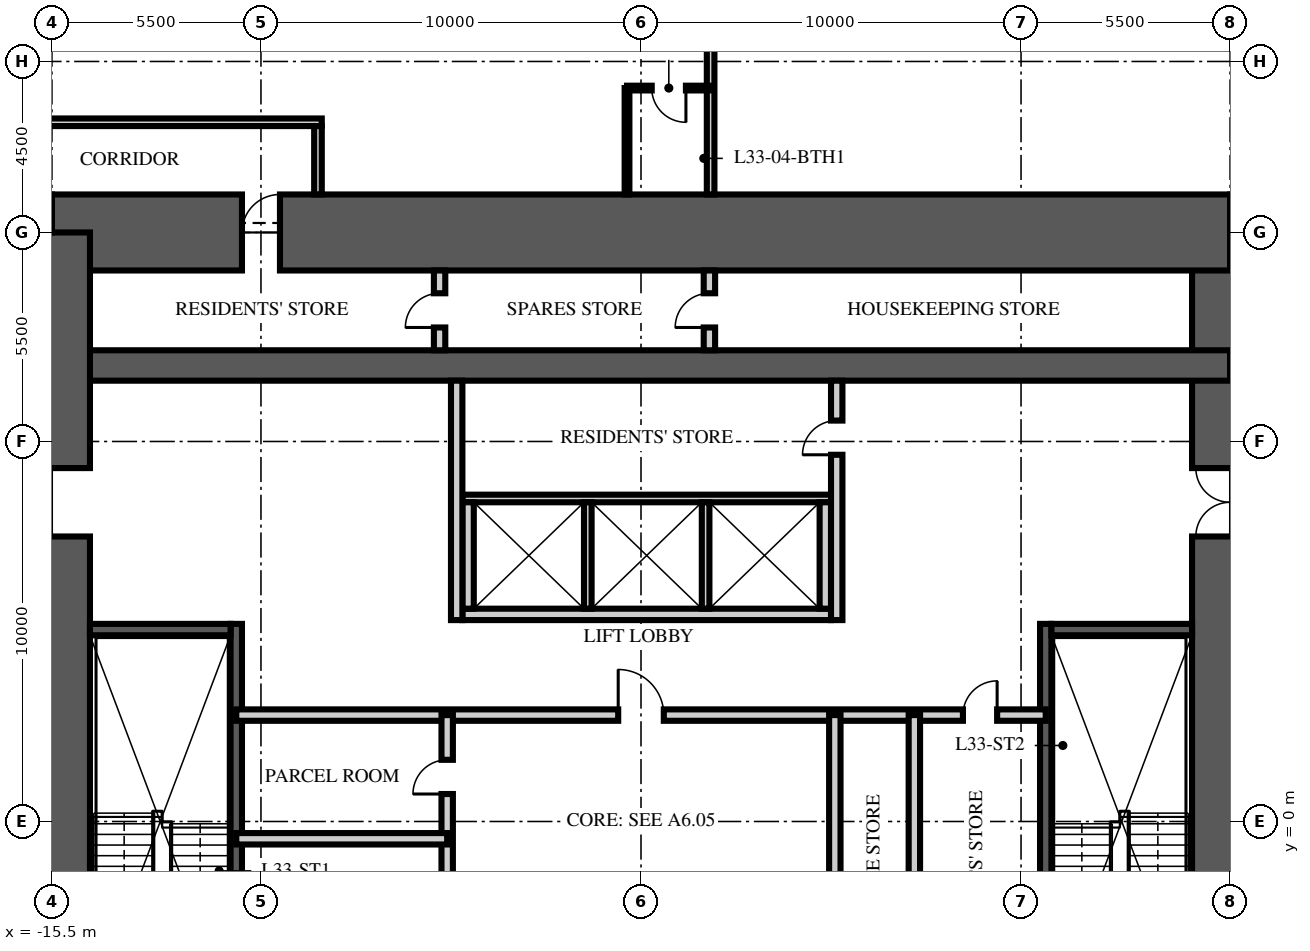
"""IFC4 building model, lengths in metres.
Left out: names, types, materials, properties, quantities, classifications, styles, units other than length and angle.
Written with IfcOpenShell. Run it as: python <this file> out.ifc"""

import sys

from ifc_helpers import new_model, si_unit, direction, frame, frame_2d, origin, place, context, subcontext, project, spatial, rectangle, extrude, element, fill, save


model = new_model("IFC4")
c1 = context("Model", 3, precision=1e-05, world=origin(), true_north=direction((0.0, 1.0)))
c2 = subcontext(c1, "Body", "Model", "MODEL_VIEW")
j1 = project(units=[si_unit("LENGTHUNIT", "METRE"), si_unit("PLANEANGLEUNIT", "RADIAN")], contexts=[c1])
p1 = place(None, origin())
s1 = spatial("IfcSite", under=j1, at=p1, CompositionType="ELEMENT")
p2 = place(p1, origin())
s2 = spatial("IfcBuilding", under=s1, at=p2, CompositionType="ELEMENT")
p3 = place(p2, frame((0.0, 0.0, 133.5)))
s3 = spatial("IfcBuildingStorey", under=s2, at=p3, CompositionType="ELEMENT", Elevation=133.5)
p4 = place(p3, frame((15.5, -15.5, -0.25), z_axis=(0.0, 0.0, 1.0), x_axis=(0.0, 1.0, 0.0)))
e1 = element("IfcWall", 1, at=p4, inside=s3, PredefinedType="SHEAR", context=c2, shape_type="SweptSolid", body=[
    extrude(rectangle(XDim=31.0, YDim=2.0, at=frame_2d((15.5, 0.0))), origin(), (0.0, 0.0, 1.0), 3.75),
])
p5 = place(p4, frame((6.5, 0.0, 0.25)))
e2 = element("IfcOpeningElement", 2, at=p5, cuts=e1, PredefinedType="OPENING", context=c2, shape_type="SweptSolid", body=[
    extrude(rectangle(XDim=1.2, YDim=2.1, at=frame_2d((0.6, 1.05))), frame((0.0, 1.01, 0.0), z_axis=(0.0, -1.0, 0.0), x_axis=(1.0, 0.0, 0.0)), (0.0, 0.0, 1.0), 2.02),
])
p6 = place(p4, frame((23.0, 0.0, 0.25)))
e3 = element("IfcOpeningElement", 3, at=p6, cuts=e1, PredefinedType="OPENING", context=c2, shape_type="SweptSolid", body=[
    extrude(rectangle(XDim=1.8, YDim=2.1, at=frame_2d((0.9, 1.05))), frame((0.0, 1.01, 0.0), z_axis=(0.0, -1.0, 0.0), x_axis=(1.0, 0.0, 0.0)), (0.0, 0.0, 1.0), 2.02),
])
p7 = place(p3, frame((-15.5, 15.5, -0.25), z_axis=(0.0, 0.0, 1.0), x_axis=(1.0, 0.0, 0.0)))
e4 = element("IfcWall", 4, at=p7, inside=s3, PredefinedType="SHEAR", context=c2, shape_type="SweptSolid", body=[
    extrude(rectangle(XDim=31.0, YDim=2.0, at=frame_2d((15.5, 0.0))), origin(), (0.0, 0.0, 1.0), 3.75),
])
p8 = place(p7, frame((5.0, 0.0, 0.25)))
e5 = element("IfcOpeningElement", 5, at=p8, cuts=e4, PredefinedType="OPENING", context=c2, shape_type="SweptSolid", body=[
    extrude(rectangle(XDim=1.0, YDim=2.1, at=frame_2d((0.5, 1.05))), frame((0.0, 1.01, 0.0), z_axis=(0.0, -1.0, 0.0), x_axis=(1.0, 0.0, 0.0)), (0.0, 0.0, 1.0), 2.02),
])
p9 = place(p3, frame((-15.5, 12.0, -0.25), z_axis=(0.0, 0.0, 1.0), x_axis=(1.0, 0.0, 0.0)))
e6 = element("IfcWall", 6, at=p9, inside=s3, PredefinedType="SHEAR", context=c2, shape_type="SweptSolid", body=[
    extrude(rectangle(XDim=31.0, YDim=0.8, at=frame_2d((15.5, 0.0))), origin(), (0.0, 0.0, 1.0), 3.75),
])
p10 = place(p3, frame((-15.5, -15.5, -0.25), z_axis=(0.0, 0.0, 1.0), x_axis=(0.0, 1.0, 0.0)))
e7 = element("IfcWall", 7, at=p10, inside=s3, PredefinedType="SHEAR", context=c2, shape_type="SweptSolid", body=[
    extrude(rectangle(XDim=31.0, YDim=2.0, at=frame_2d((15.5, 0.0))), origin(), (0.0, 0.0, 1.0), 3.75),
])
p11 = place(p10, frame((6.5, 0.0, 0.25)))
e8 = element("IfcOpeningElement", 8, at=p11, cuts=e7, PredefinedType="OPENING", context=c2, shape_type="SweptSolid", body=[
    extrude(rectangle(XDim=1.2, YDim=2.1, at=frame_2d((0.6, 1.05))), frame((0.0, 1.01, 0.0), z_axis=(0.0, -1.0, 0.0), x_axis=(1.0, 0.0, 0.0)), (0.0, 0.0, 1.0), 2.02),
])
p12 = place(p10, frame((23.0, 0.0, 0.25)))
e9 = element("IfcOpeningElement", 9, at=p12, cuts=e7, PredefinedType="OPENING", context=c2, shape_type="SweptSolid", body=[
    extrude(rectangle(XDim=1.8, YDim=2.1, at=frame_2d((0.9, 1.05))), frame((0.0, 1.01, 0.0), z_axis=(0.0, -1.0, 0.0), x_axis=(1.0, 0.0, 0.0)), (0.0, 0.0, 1.0), 2.02),
])
p13 = place(p3, frame((-10.65, -4.9, 0.0), z_axis=(0.0, 0.0, 1.0), x_axis=(0.0, 1.0, 0.0)))
e10 = element("IfcWall", 10, at=p13, inside=s3, PredefinedType="SOLIDWALL", context=c2, shape_type="SweptSolid", body=[
    extrude(rectangle(XDim=10.1, YDim=0.3, at=frame_2d((5.05, 0.0))), origin(), (0.0, 0.0, 1.0), 3.5),
])
p14 = place(p3, frame((-14.5, 5.05, 0.0), z_axis=(0.0, 0.0, 1.0), x_axis=(1.0, 0.0, 0.0)))
e11 = element("IfcWall", 11, at=p14, inside=s3, PredefinedType="SOLIDWALL", context=c2, shape_type="SweptSolid", body=[
    extrude(rectangle(XDim=3.7, YDim=0.3, at=frame_2d((1.85, 0.0))), origin(), (0.0, 0.0, 1.0), 3.5),
])
p15 = place(p3, frame((10.65, -4.9, 0.0), z_axis=(0.0, 0.0, 1.0), x_axis=(0.0, 1.0, 0.0)))
e12 = element("IfcWall", 12, at=p15, inside=s3, PredefinedType="SOLIDWALL", context=c2, shape_type="SweptSolid", body=[
    extrude(rectangle(XDim=10.1, YDim=0.3, at=frame_2d((5.05, 0.0))), origin(), (0.0, 0.0, 1.0), 3.5),
])
p16 = place(p3, frame((14.5, 5.05, 0.0), z_axis=(0.0, 0.0, 1.0), x_axis=(-1.0, 0.0, 0.0)))
e13 = element("IfcWall", 13, at=p16, inside=s3, PredefinedType="SOLIDWALL", context=c2, shape_type="SweptSolid", body=[
    extrude(rectangle(XDim=3.7, YDim=0.3, at=frame_2d((1.85, 0.0))), origin(), (0.0, 0.0, 1.0), 3.5),
])
p17 = place(p3, frame((-4.7, 5.45, 0.0), z_axis=(0.0, 0.0, 1.0), x_axis=(1.0, 0.0, 0.0)))
e14 = element("IfcWall", 14, at=p17, inside=s3, PredefinedType="PARTITIONING", context=c2, shape_type="SweptSolid", body=[
    extrude(rectangle(XDim=9.7, YDim=0.3, at=frame_2d((4.85, 0.0))), origin(), (0.0, 0.0, 1.0), 3.5),
])
p18 = place(p3, frame((-4.7, 8.5, 0.0), z_axis=(0.0, 0.0, 1.0), x_axis=(1.0, 0.0, 0.0)))
e15 = element("IfcWall", 15, at=p18, inside=s3, PredefinedType="PARTITIONING", context=c2, shape_type="SweptSolid", body=[
    extrude(rectangle(XDim=9.7, YDim=0.2, at=frame_2d((4.85, 0.0))), origin(), (0.0, 0.0, 1.0), 3.5),
])
for number, where, z_axis, x_axis in (
    (16, (-4.55, 5.6, 0.0), (0.0, 0.0, 1.0), (0.0, 1.0, 0.0)),
    (17, (4.85, 5.6, 0.0), (0.0, 0.0, 1.0), (0.0, 1.0, 0.0)),
):
    element("IfcWall", number, at=place(p3, frame(where, z_axis=z_axis, x_axis=x_axis)), inside=s3, PredefinedType="PARTITIONING", context=c2, shape_type="SweptSolid", body=[
        extrude(rectangle(XDim=2.8, YDim=0.3, at=frame_2d((1.4, 0.0))), origin(), (0.0, 0.0, 1.0), 3.5),
    ])
for number, where, z_axis, x_axis in (
    (18, (-1.4, 5.6, 0.0), (0.0, 0.0, 1.0), (0.0, 1.0, 0.0)),
    (19, (1.7, 5.6, 0.0), (0.0, 0.0, 1.0), (0.0, 1.0, 0.0)),
):
    element("IfcWall", number, at=place(p3, frame(where, z_axis=z_axis, x_axis=x_axis)), inside=s3, PredefinedType="PARTITIONING", context=c2, shape_type="SweptSolid", body=[
        extrude(rectangle(XDim=2.8, YDim=0.2, at=frame_2d((1.4, 0.0))), origin(), (0.0, 0.0, 1.0), 3.5),
    ])
p19 = place(p3, frame((-10.65, 2.8, 0.0), z_axis=(0.0, 0.0, 1.0), x_axis=(1.0, 0.0, 0.0)))
e20 = element("IfcWall", 20, at=p19, inside=s3, PredefinedType="PARTITIONING", context=c2, shape_type="SweptSolid", body=[
    extrude(rectangle(XDim=21.3, YDim=0.3, at=frame_2d((10.65, 0.0))), origin(), (0.0, 0.0, 1.0), 3.5),
])
p20 = place(p19, frame((10.05, 0.0, 0.0)))
e21 = element("IfcOpeningElement", 21, at=p20, cuts=e20, PredefinedType="OPENING", context=c2, shape_type="SweptSolid", body=[
    extrude(rectangle(XDim=1.2, YDim=2.1, at=frame_2d((0.6, 1.05))), frame((0.0, 0.16, 0.0), z_axis=(0.0, -1.0, 0.0), x_axis=(1.0, 0.0, 0.0)), (0.0, 0.0, 1.0), 0.32),
])
p21 = place(p19, frame((19.121, 0.0, 0.0)))
e22 = element("IfcOpeningElement", 22, at=p21, cuts=e20, PredefinedType="OPENING", context=c2, shape_type="SweptSolid", body=[
    extrude(rectangle(XDim=0.9, YDim=2.1, at=frame_2d((0.45, 1.05))), frame((0.0, 0.16, 0.0), z_axis=(0.0, -1.0, 0.0), x_axis=(1.0, 0.0, 0.0)), (0.0, 0.0, 1.0), 0.32),
])
p22 = place(p3, frame((-5.1, -6.65, 0.0), z_axis=(0.0, 0.0, 1.0), x_axis=(0.0, 1.0, 0.0)))
e23 = element("IfcWall", 23, at=p22, inside=s3, PredefinedType="PARTITIONING", context=c2, shape_type="SweptSolid", body=[
    extrude(rectangle(XDim=9.45, YDim=0.3, at=frame_2d((4.725, 0.0))), origin(), (0.0, 0.0, 1.0), 3.5),
])
p23 = place(p22, frame((2.648, 0.0, 0.0)))
e24 = element("IfcOpeningElement", 24, at=p23, cuts=e23, PredefinedType="OPENING", context=c2, shape_type="SweptSolid", body=[
    extrude(rectangle(XDim=0.9, YDim=2.1, at=frame_2d((0.45, 1.05))), frame((0.0, 0.16, 0.0), z_axis=(0.0, -1.0, 0.0), x_axis=(1.0, 0.0, 0.0)), (0.0, 0.0, 1.0), 0.32),
])
p24 = place(p22, frame((7.373, 0.0, 0.0)))
e25 = element("IfcOpeningElement", 25, at=p24, cuts=e23, PredefinedType="OPENING", context=c2, shape_type="SweptSolid", body=[
    extrude(rectangle(XDim=0.9, YDim=2.1, at=frame_2d((0.45, 1.05))), frame((0.0, 0.16, 0.0), z_axis=(0.0, -1.0, 0.0), x_axis=(1.0, 0.0, 0.0)), (0.0, 0.0, 1.0), 0.32),
])
p25 = place(p3, frame((5.1, -6.65, 0.0), z_axis=(0.0, 0.0, 1.0), x_axis=(0.0, 1.0, 0.0)))
e26 = element("IfcWall", 26, at=p25, inside=s3, PredefinedType="PARTITIONING", context=c2, shape_type="SweptSolid", body=[
    extrude(rectangle(XDim=9.45, YDim=0.3, at=frame_2d((4.725, 0.0))), origin(), (0.0, 0.0, 1.0), 3.5),
])
p26 = place(p25, frame((4.275, 0.0, 0.0)))
e27 = element("IfcOpeningElement", 27, at=p26, cuts=e26, PredefinedType="OPENING", context=c2, shape_type="SweptSolid", body=[
    extrude(rectangle(XDim=0.9, YDim=2.1, at=frame_2d((0.45, 1.05))), frame((0.0, 0.16, 0.0), z_axis=(0.0, -1.0, 0.0), x_axis=(1.0, 0.0, 0.0)), (0.0, 0.0, 1.0), 0.32),
])
p27 = place(p3, frame((-10.65, -0.455, 0.0), z_axis=(0.0, 0.0, 1.0), x_axis=(1.0, 0.0, 0.0)))
e28 = element("IfcWall", 28, at=p27, inside=s3, PredefinedType="PARTITIONING", context=c2, shape_type="SweptSolid", body=[
    extrude(rectangle(XDim=5.55, YDim=0.3, at=frame_2d((2.775, 0.0))), origin(), (0.0, 0.0, 1.0), 3.5),
])
p28 = place(p3, frame((7.193, -6.65, 0.0), z_axis=(0.0, 0.0, 1.0), x_axis=(0.0, 1.0, 0.0)))
e29 = element("IfcWall", 29, at=p28, inside=s3, PredefinedType="PARTITIONING", context=c2, shape_type="SweptSolid", body=[
    extrude(rectangle(XDim=9.45, YDim=0.3, at=frame_2d((4.725, 0.0))), origin(), (0.0, 0.0, 1.0), 3.5),
])
p29 = place(p3, frame((-4.85, 5.3, 0.0), z_axis=(0.0, 0.0, 1.0), x_axis=(0.0, 1.0, 0.0)))
e30 = element("IfcWall", 30, at=p29, inside=s3, PredefinedType="PARTITIONING", context=c2, shape_type="SweptSolid", body=[
    extrude(rectangle(XDim=6.3, YDim=0.3, at=frame_2d((3.15, 0.0))), origin(), (0.0, 0.0, 1.0), 3.5),
])
p30 = place(p3, frame((5.15, 5.3, 0.0), z_axis=(0.0, 0.0, 1.0), x_axis=(0.0, 1.0, 0.0)))
e31 = element("IfcWall", 31, at=p30, inside=s3, PredefinedType="PARTITIONING", context=c2, shape_type="SweptSolid", body=[
    extrude(rectangle(XDim=6.3, YDim=0.3, at=frame_2d((3.15, 0.0))), origin(), (0.0, 0.0, 1.0), 3.5),
])
p31 = place(p30, frame((4.35, 0.0, 0.0)))
e32 = element("IfcOpeningElement", 32, at=p31, cuts=e31, PredefinedType="OPENING", context=c2, shape_type="SweptSolid", body=[
    extrude(rectangle(XDim=0.9, YDim=2.1, at=frame_2d((0.45, 1.05))), frame((0.0, 0.16, 0.0), z_axis=(0.0, -1.0, 0.0), x_axis=(1.0, 0.0, 0.0)), (0.0, 0.0, 1.0), 0.32),
])
p32 = place(p3, frame((-5.3, 12.4, 0.0), z_axis=(0.0, 0.0, 1.0), x_axis=(0.0, 1.0, 0.0)))
e33 = element("IfcWall", 33, at=p32, inside=s3, PredefinedType="PARTITIONING", context=c2, shape_type="SweptSolid", body=[
    extrude(rectangle(XDim=2.1, YDim=0.3, at=frame_2d((1.05, 0.0))), origin(), (0.0, 0.0, 1.0), 3.5),
])
p33 = place(p32, frame((0.6, 0.0, 0.0)))
e34 = element("IfcOpeningElement", 34, at=p33, cuts=e33, PredefinedType="OPENING", context=c2, shape_type="SweptSolid", body=[
    extrude(rectangle(XDim=0.9, YDim=2.1, at=frame_2d((0.45, 1.05))), frame((0.0, 0.16, 0.0), z_axis=(0.0, -1.0, 0.0), x_axis=(1.0, 0.0, 0.0)), (0.0, 0.0, 1.0), 0.32),
])
p34 = place(p3, frame((1.8, 12.4, 0.0), z_axis=(0.0, 0.0, 1.0), x_axis=(0.0, 1.0, 0.0)))
e35 = element("IfcWall", 35, at=p34, inside=s3, PredefinedType="PARTITIONING", context=c2, shape_type="SweptSolid", body=[
    extrude(rectangle(XDim=2.1, YDim=0.3, at=frame_2d((1.05, 0.0))), origin(), (0.0, 0.0, 1.0), 3.5),
])
p35 = place(p34, frame((0.6, 0.0, 0.0)))
e36 = element("IfcOpeningElement", 36, at=p35, cuts=e35, PredefinedType="OPENING", context=c2, shape_type="SweptSolid", body=[
    extrude(rectangle(XDim=0.9, YDim=2.1, at=frame_2d((0.45, 1.05))), frame((0.0, 0.16, 0.0), z_axis=(0.0, -1.0, 0.0), x_axis=(1.0, 0.0, 0.0)), (0.0, 0.0, 1.0), 0.32),
])
p36 = place(p3, frame((-18.5, 18.4, 0.0), z_axis=(0.0, 0.0, 1.0), x_axis=(1.0, 0.0, 0.0)))
e37 = element("IfcWall", 37, at=p36, inside=s3, PredefinedType="PARTITIONING", context=c2, shape_type="SweptSolid", body=[
    extrude(rectangle(XDim=10.1, YDim=0.2, at=frame_2d((5.05, 0.0))), origin(), (0.0, 0.0, 1.0), 2.3),
])
p37 = place(p3, frame((-8.5, 18.3, 0.0), z_axis=(0.0, 0.0, 1.0), x_axis=(0.0, -1.0, 0.0)))
e38 = element("IfcWall", 38, at=p37, inside=s3, PredefinedType="PARTITIONING", context=c2, shape_type="SweptSolid", body=[
    extrude(rectangle(XDim=1.8, YDim=0.2, at=frame_2d((0.9, 0.0))), origin(), (0.0, 0.0, 1.0), 3.5),
])
p38 = place(p3, frame((1.832, 16.5, 0.0), z_axis=(0.0, 0.0, 1.0), x_axis=(0.0, 1.0, 0.0)))
e39 = element("IfcWall", 39, at=p38, inside=s3, PredefinedType="PARTITIONING", context=c2, shape_type="SweptSolid", body=[
    extrude(rectangle(XDim=12.4, YDim=0.2, at=frame_2d((6.2, 0.0))), origin(), (0.0, 0.0, 1.0), 2.81),
])
p39 = place(p3, frame((1.832, 19.3, 0.0), z_axis=(0.0, 0.0, 1.0), x_axis=(-1.0, 0.0, 0.0)))
e40 = element("IfcWall", 40, at=p39, inside=s3, PredefinedType="PARTITIONING", context=c2, shape_type="SweptSolid", body=[
    extrude(rectangle(XDim=2.2, YDim=0.125, at=frame_2d((1.1, 0.0))), origin(), (0.0, 0.0, 1.0), 2.7),
])
p40 = place(p39, frame((0.65, 0.0, 0.0)))
e41 = element("IfcOpeningElement", 41, at=p40, cuts=e40, PredefinedType="OPENING", context=c2, shape_type="SweptSolid", body=[
    extrude(rectangle(XDim=0.9, YDim=2.1, at=frame_2d((0.45, 1.05))), frame((0.0, 0.073, 0.0), z_axis=(0.0, -1.0, 0.0), x_axis=(1.0, 0.0, 0.0)), (0.0, 0.0, 1.0), 0.145),
])
p41 = place(p3, frame((-0.368, 16.5, 0.0), z_axis=(0.0, 0.0, 1.0), x_axis=(0.0, 1.0, 0.0)))
e42 = element("IfcWall", 42, at=p41, inside=s3, PredefinedType="PARTITIONING", context=c2, shape_type="SweptSolid", body=[
    extrude(rectangle(XDim=2.8, YDim=0.125, at=frame_2d((1.4, 0.0))), origin(), (0.0, 0.0, 1.0), 3.5),
])
p42 = place(p12, origin())
e43 = element("IfcDoor", 43, at=p42, inside=s3, OperationType="DOUBLE_DOOR_SINGLE_SWING", PredefinedType="DOOR", context=c2, shape_type="SweptSolid", body=[
    extrude(rectangle(XDim=1.8, YDim=2.1, at=frame_2d((0.9, 1.05))), frame((0.0, 0.025, 0.0), z_axis=(0.0, -1.0, 0.0), x_axis=(1.0, 0.0, 0.0)), (0.0, 0.0, 1.0), 0.05),
])
fill(e9, e43)
p43 = place(p6, origin())
e44 = element("IfcDoor", 44, at=p43, inside=s3, OperationType="DOUBLE_DOOR_SINGLE_SWING", PredefinedType="DOOR", context=c2, shape_type="SweptSolid", body=[
    extrude(rectangle(XDim=1.8, YDim=2.1, at=frame_2d((0.9, 1.05))), frame((0.0, 0.025, 0.0), z_axis=(0.0, -1.0, 0.0), x_axis=(1.0, 0.0, 0.0)), (0.0, 0.0, 1.0), 0.05),
])
fill(e3, e44)
p44 = place(p20, origin())
e45 = element("IfcDoor", 45, at=p44, inside=s3, OperationType="SINGLE_SWING_LEFT", PredefinedType="DOOR", context=c2, shape_type="SweptSolid", body=[
    extrude(rectangle(XDim=1.2, YDim=2.1, at=frame_2d((0.6, 1.05))), frame((0.0, 0.025, 0.0), z_axis=(0.0, -1.0, 0.0), x_axis=(1.0, 0.0, 0.0)), (0.0, 0.0, 1.0), 0.05),
])
fill(e21, e45)
p45 = place(p24, origin())
e46 = element("IfcDoor", 46, at=p45, inside=s3, OperationType="SINGLE_SWING_LEFT", PredefinedType="DOOR", context=c2, shape_type="SweptSolid", body=[
    extrude(rectangle(XDim=0.9, YDim=2.1, at=frame_2d((0.45, 1.05))), frame((0.0, 0.025, 0.0), z_axis=(0.0, -1.0, 0.0), x_axis=(1.0, 0.0, 0.0)), (0.0, 0.0, 1.0), 0.05),
])
fill(e25, e46)
p46 = place(p21, origin())
e47 = element("IfcDoor", 47, at=p46, inside=s3, OperationType="SINGLE_SWING_RIGHT", PredefinedType="DOOR", context=c2, shape_type="SweptSolid", body=[
    extrude(rectangle(XDim=0.9, YDim=2.1, at=frame_2d((0.45, 1.05))), frame((0.0, 0.025, 0.0), z_axis=(0.0, -1.0, 0.0), x_axis=(1.0, 0.0, 0.0)), (0.0, 0.0, 1.0), 0.05),
])
fill(e22, e47)
p47 = place(p31, origin())
e48 = element("IfcDoor", 48, at=p47, inside=s3, OperationType="SINGLE_SWING_LEFT", PredefinedType="DOOR", context=c2, shape_type="SweptSolid", body=[
    extrude(rectangle(XDim=0.9, YDim=2.1, at=frame_2d((0.45, 1.05))), frame((0.0, 0.025, 0.0), z_axis=(0.0, -1.0, 0.0), x_axis=(1.0, 0.0, 0.0)), (0.0, 0.0, 1.0), 0.05),
])
fill(e32, e48)
p48 = place(p33, origin())
e49 = element("IfcDoor", 49, at=p48, inside=s3, OperationType="SINGLE_SWING_LEFT", PredefinedType="DOOR", context=c2, shape_type="SweptSolid", body=[
    extrude(rectangle(XDim=0.9, YDim=2.1, at=frame_2d((0.45, 1.05))), frame((0.0, 0.025, 0.0), z_axis=(0.0, -1.0, 0.0), x_axis=(1.0, 0.0, 0.0)), (0.0, 0.0, 1.0), 0.05),
])
fill(e34, e49)
p49 = place(p35, origin())
e50 = element("IfcDoor", 50, at=p49, inside=s3, OperationType="SINGLE_SWING_LEFT", PredefinedType="DOOR", context=c2, shape_type="SweptSolid", body=[
    extrude(rectangle(XDim=0.9, YDim=2.1, at=frame_2d((0.45, 1.05))), frame((0.0, 0.025, 0.0), z_axis=(0.0, -1.0, 0.0), x_axis=(1.0, 0.0, 0.0)), (0.0, 0.0, 1.0), 0.05),
])
fill(e36, e50)
p50 = place(p8, origin())
e51 = element("IfcDoor", 51, at=p50, inside=s3, OperationType="SINGLE_SWING_RIGHT", PredefinedType="DOOR", context=c2, shape_type="SweptSolid", body=[
    extrude(rectangle(XDim=1.0, YDim=2.1, at=frame_2d((0.5, 1.05))), frame((0.0, 0.025, 0.0), z_axis=(0.0, -1.0, 0.0), x_axis=(1.0, 0.0, 0.0)), (0.0, 0.0, 1.0), 0.05),
])
fill(e5, e51)
p51 = place(p40, origin())
e52 = element("IfcDoor", 52, at=p51, inside=s3, OperationType="SINGLE_SWING_LEFT", PredefinedType="DOOR", context=c2, shape_type="SweptSolid", body=[
    extrude(rectangle(XDim=0.9, YDim=2.1, at=frame_2d((0.45, 1.05))), frame((0.0, 0.025, 0.0), z_axis=(0.0, -1.0, 0.0), x_axis=(1.0, 0.0, 0.0)), (0.0, 0.0, 1.0), 0.05),
])
fill(e41, e52)
save(model, sys.argv[1])
